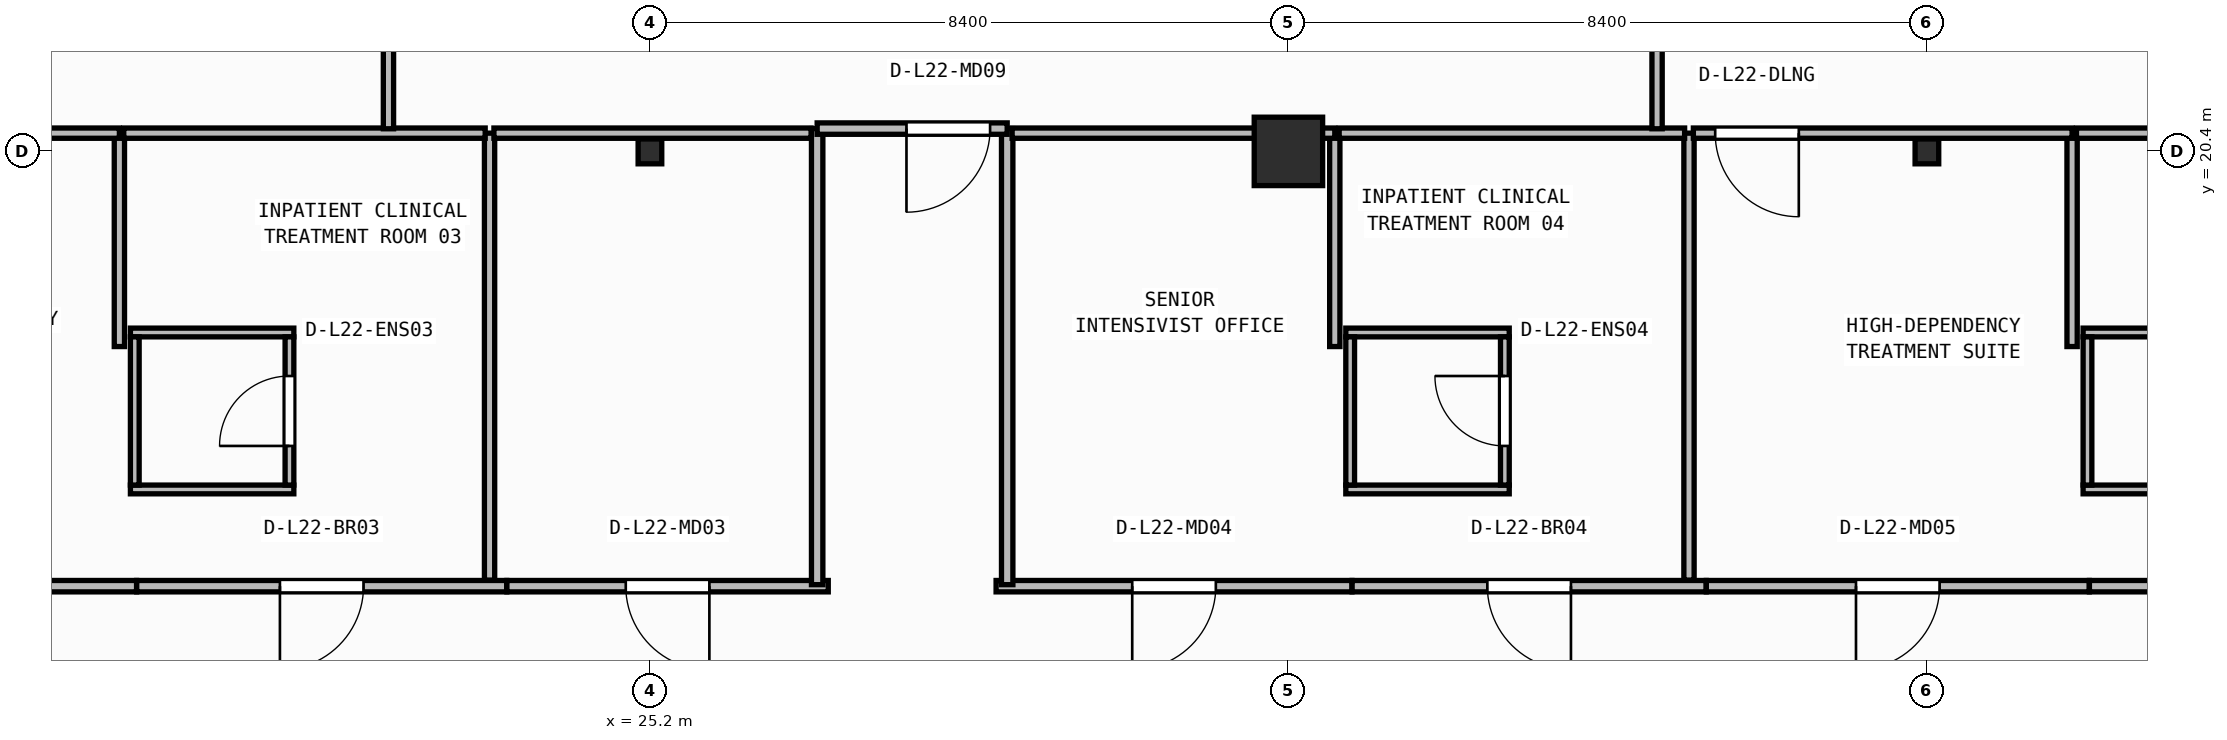
"""IFC4 building model, lengths in metres.
Left out: names, types, materials, properties, quantities, classifications, styles, units other than length and angle.
Written with IfcOpenShell. Run it as: python <this file> out.ifc"""

import sys

from ifc_helpers import new_model, si_unit, direction, frame, frame_2d, origin, origin_2d, place, context, subcontext, project, spatial, rectangle, i_section, extrude, element, fill, save


model = new_model("IFC4")
c1 = context("Model", 3, precision=1e-05, world=origin(), true_north=direction((0.0, 1.0)))
c2 = subcontext(c1, "Body", "Model", "MODEL_VIEW")
j1 = project(units=[si_unit("LENGTHUNIT", "METRE"), si_unit("PLANEANGLEUNIT", "RADIAN")], contexts=[c1])
p1 = place(None, origin())
s1 = spatial("IfcSite", under=j1, at=p1, CompositionType="ELEMENT")
p2 = place(p1, origin())
s2 = spatial("IfcBuilding", under=s1, at=p2, CompositionType="ELEMENT")
p3 = place(p2, frame((0.0, 0.0, 89.65)))
s3 = spatial("IfcBuildingStorey", under=s2, at=p3, CompositionType="ELEMENT", Elevation=89.65)
p4 = place(p3, frame((25.2, 20.4, 0.0), z_axis=(0.0, 0.0, 1.0), x_axis=(1.0, 0.0, 0.0)))
e1 = element("IfcColumn", 1, at=p4, inside=s3, PredefinedType="COLUMN", context=c2, shape_type="SweptSolid", body=[
    extrude(i_section(OverallWidth=0.311, OverallDepth=0.327, WebThickness=0.016, FlangeThickness=0.025, FilletRadius=0.017, at=origin_2d()), origin(), (0.0, 0.0, 1.0), 3.95),
])
p5 = place(p3, frame((33.6, 20.4, 0.0), z_axis=(0.0, 0.0, 1.0), x_axis=(1.0, 0.0, 0.0)))
e2 = element("IfcColumn", 2, at=p5, inside=s3, PredefinedType="COLUMN", context=c2, shape_type="SweptSolid", body=[
    extrude(rectangle(XDim=0.9, YDim=0.9, at=origin_2d()), origin(), (0.0, 0.0, 1.0), 3.95),
])
p6 = place(p3, frame((42.0, 20.4, 0.0), z_axis=(0.0, 0.0, 1.0), x_axis=(1.0, 0.0, 0.0)))
e3 = element("IfcColumn", 3, at=p6, inside=s3, PredefinedType="COLUMN", context=c2, shape_type="SweptSolid", body=[
    extrude(i_section(OverallWidth=0.311, OverallDepth=0.327, WebThickness=0.016, FlangeThickness=0.025, FilletRadius=0.017, at=origin_2d()), origin(), (0.0, 0.0, 1.0), 3.95),
])
for number, where, z_axis, x_axis in (
    (4, (18.365, 15.952, 0.0), (0.0, 0.0, 1.0), (1.0, 0.0, 0.0)),
    (5, (18.365, 18.018, 0.0), (0.0, 0.0, 1.0), (1.0, 0.0, 0.0)),
):
    element("IfcWall", number, at=place(p3, frame(where, z_axis=z_axis, x_axis=x_axis)), inside=s3, PredefinedType="PARTITIONING", context=c2, shape_type="SweptSolid", body=[
        extrude(rectangle(XDim=2.15, YDim=0.115, at=frame_2d((1.075, 0.0))), origin(), (0.0, 0.0, 1.0), 3.71),
    ])
p7 = place(p3, frame((18.423, 16.01, 0.0), z_axis=(0.0, 0.0, 1.0), x_axis=(0.0, 1.0, 0.0)))
e6 = element("IfcWall", 6, at=p7, inside=s3, PredefinedType="PARTITIONING", context=c2, shape_type="SweptSolid", body=[
    extrude(rectangle(XDim=1.95, YDim=0.115, at=frame_2d((0.975, 0.0))), origin(), (0.0, 0.0, 1.0), 3.71),
])
p8 = place(p3, frame((20.458, 16.01, 0.0), z_axis=(0.0, 0.0, 1.0), x_axis=(0.0, 1.0, 0.0)))
e7 = element("IfcWall", 7, at=p8, inside=s3, PredefinedType="PARTITIONING", context=c2, shape_type="SweptSolid", body=[
    extrude(rectangle(XDim=1.95, YDim=0.115, at=frame_2d((0.975, 0.0))), origin(), (0.0, 0.0, 1.0), 3.71),
])
p9 = place(p8, frame((0.515, 0.0, 0.0)))
e8 = element("IfcOpeningElement", 8, at=p9, cuts=e7, PredefinedType="OPENING", context=c2, shape_type="SweptSolid", body=[
    extrude(rectangle(XDim=0.92, YDim=2.1, at=frame_2d((0.46, 1.05))), frame((0.0, 0.067, 0.0), z_axis=(0.0, -1.0, 0.0), x_axis=(1.0, 0.0, 0.0)), (0.0, 0.0, 1.0), 0.135),
])
p10 = place(p3, frame((34.355, 15.952, 0.0), z_axis=(0.0, 0.0, 1.0), x_axis=(1.0, 0.0, 0.0)))
e9 = element("IfcWall", 9, at=p10, inside=s3, PredefinedType="PARTITIONING", context=c2, shape_type="SweptSolid", body=[
    extrude(rectangle(XDim=2.15, YDim=0.115, at=frame_2d((1.075, 0.0))), origin(), (0.0, 0.0, 1.0), 3.329),
])
p11 = place(p3, frame((34.355, 18.018, 0.0), z_axis=(0.0, 0.0, 1.0), x_axis=(1.0, 0.0, 0.0)))
e10 = element("IfcWall", 10, at=p11, inside=s3, PredefinedType="PARTITIONING", context=c2, shape_type="SweptSolid", body=[
    extrude(rectangle(XDim=2.15, YDim=0.115, at=frame_2d((1.075, 0.0))), origin(), (0.0, 0.0, 1.0), 3.71),
])
p12 = place(p3, frame((34.413, 16.01, 0.0), z_axis=(0.0, 0.0, 1.0), x_axis=(0.0, 1.0, 0.0)))
e11 = element("IfcWall", 11, at=p12, inside=s3, PredefinedType="PARTITIONING", context=c2, shape_type="SweptSolid", body=[
    extrude(rectangle(XDim=1.95, YDim=0.115, at=frame_2d((0.975, 0.0))), origin(), (0.0, 0.0, 1.0), 3.71),
])
p13 = place(p3, frame((36.448, 16.01, 0.0), z_axis=(0.0, 0.0, 1.0), x_axis=(0.0, 1.0, 0.0)))
e12 = element("IfcWall", 12, at=p13, inside=s3, PredefinedType="PARTITIONING", context=c2, shape_type="SweptSolid", body=[
    extrude(rectangle(XDim=1.95, YDim=0.115, at=frame_2d((0.975, 0.0))), origin(), (0.0, 0.0, 1.0), 3.71),
])
p14 = place(p13, frame((0.515, 0.0, 0.0)))
e13 = element("IfcOpeningElement", 13, at=p14, cuts=e12, PredefinedType="OPENING", context=c2, shape_type="SweptSolid", body=[
    extrude(rectangle(XDim=0.92, YDim=2.1, at=frame_2d((0.46, 1.05))), frame((0.0, 0.067, 0.0), z_axis=(0.0, -1.0, 0.0), x_axis=(1.0, 0.0, 0.0)), (0.0, 0.0, 1.0), 0.135),
])
p15 = place(p3, frame((44.055, 15.952, 0.0), z_axis=(0.0, 0.0, 1.0), x_axis=(1.0, 0.0, 0.0)))
e14 = element("IfcWall", 14, at=p15, inside=s3, PredefinedType="PARTITIONING", context=c2, shape_type="SweptSolid", body=[
    extrude(rectangle(XDim=2.15, YDim=0.115, at=frame_2d((1.075, 0.0))), origin(), (0.0, 0.0, 1.0), 3.329),
])
p16 = place(p3, frame((44.055, 18.018, 0.0), z_axis=(0.0, 0.0, 1.0), x_axis=(1.0, 0.0, 0.0)))
e15 = element("IfcWall", 15, at=p16, inside=s3, PredefinedType="PARTITIONING", context=c2, shape_type="SweptSolid", body=[
    extrude(rectangle(XDim=2.15, YDim=0.115, at=frame_2d((1.075, 0.0))), origin(), (0.0, 0.0, 1.0), 3.71),
])
p17 = place(p3, frame((44.113, 16.01, 0.0), z_axis=(0.0, 0.0, 1.0), x_axis=(0.0, 1.0, 0.0)))
e16 = element("IfcWall", 16, at=p17, inside=s3, PredefinedType="PARTITIONING", context=c2, shape_type="SweptSolid", body=[
    extrude(rectangle(XDim=1.95, YDim=0.115, at=frame_2d((0.975, 0.0))), origin(), (0.0, 0.0, 1.0), 3.71),
])
p18 = place(p3, frame((18.446, 14.68, 0.0), z_axis=(0.0, 0.0, 1.0), x_axis=(-1.0, 0.0, 0.0)))
e17 = element("IfcWall", 17, at=p18, inside=s3, PredefinedType="PARTITIONING", context=c2, shape_type="SweptSolid", body=[
    extrude(rectangle(XDim=4.508, YDim=0.15, at=frame_2d((2.254, 0.0))), origin(), (0.0, 0.0, 1.0), 3.71),
])
p19 = place(p18, frame((1.704, 0.0, 0.0)))
e18 = element("IfcOpeningElement", 18, at=p19, cuts=e17, PredefinedType="OPENING", context=c2, shape_type="SweptSolid", body=[
    extrude(rectangle(XDim=1.1, YDim=2.1, at=frame_2d((0.55, 1.05))), frame((0.0, 0.085, 0.0), z_axis=(0.0, -1.0, 0.0), x_axis=(1.0, 0.0, 0.0)), (0.0, 0.0, 1.0), 0.17),
])
p20 = place(p3, frame((23.316, 14.68, 0.0), z_axis=(0.0, 0.0, 1.0), x_axis=(-1.0, 0.0, 0.0)))
e19 = element("IfcWall", 19, at=p20, inside=s3, PredefinedType="PARTITIONING", context=c2, shape_type="SweptSolid", body=[
    extrude(rectangle(XDim=4.868, YDim=0.15, at=frame_2d((2.434, 0.0))), origin(), (0.0, 0.0, 1.0), 3.71),
])
p21 = place(p20, frame((1.884, 0.0, 0.0)))
e20 = element("IfcOpeningElement", 20, at=p21, cuts=e19, PredefinedType="OPENING", context=c2, shape_type="SweptSolid", body=[
    extrude(rectangle(XDim=1.1, YDim=2.1, at=frame_2d((0.55, 1.05))), frame((0.0, 0.085, 0.0), z_axis=(0.0, -1.0, 0.0), x_axis=(1.0, 0.0, 0.0)), (0.0, 0.0, 1.0), 0.17),
])
p22 = place(p3, frame((27.546, 14.68, 0.0), z_axis=(0.0, 0.0, 1.0), x_axis=(-1.0, 0.0, 0.0)))
e21 = element("IfcWall", 21, at=p22, inside=s3, PredefinedType="PARTITIONING", context=c2, shape_type="SweptSolid", body=[
    extrude(rectangle(XDim=4.228, YDim=0.15, at=frame_2d((2.114, 0.0))), origin(), (0.0, 0.0, 1.0), 3.71),
])
p23 = place(p22, frame((1.564, 0.0, 0.0)))
e22 = element("IfcOpeningElement", 22, at=p23, cuts=e21, PredefinedType="OPENING", context=c2, shape_type="SweptSolid", body=[
    extrude(rectangle(XDim=1.1, YDim=2.1, at=frame_2d((0.55, 1.05))), frame((0.0, 0.085, 0.0), z_axis=(0.0, -1.0, 0.0), x_axis=(1.0, 0.0, 0.0)), (0.0, 0.0, 1.0), 0.17),
])
p24 = place(p3, frame((34.436, 14.68, 0.0), z_axis=(0.0, 0.0, 1.0), x_axis=(-1.0, 0.0, 0.0)))
e23 = element("IfcWall", 23, at=p24, inside=s3, PredefinedType="PARTITIONING", context=c2, shape_type="SweptSolid", body=[
    extrude(rectangle(XDim=4.682, YDim=0.15, at=frame_2d((2.341, 0.0))), origin(), (0.0, 0.0, 1.0), 3.71),
])
p25 = place(p24, frame((1.791, 0.0, 0.0)))
e24 = element("IfcOpeningElement", 24, at=p25, cuts=e23, PredefinedType="OPENING", context=c2, shape_type="SweptSolid", body=[
    extrude(rectangle(XDim=1.1, YDim=2.1, at=frame_2d((0.55, 1.05))), frame((0.0, 0.085, 0.0), z_axis=(0.0, -1.0, 0.0), x_axis=(1.0, 0.0, 0.0)), (0.0, 0.0, 1.0), 0.17),
])
p26 = place(p3, frame((39.096, 14.68, 0.0), z_axis=(0.0, 0.0, 1.0), x_axis=(-1.0, 0.0, 0.0)))
e25 = element("IfcWall", 25, at=p26, inside=s3, PredefinedType="PARTITIONING", context=c2, shape_type="SweptSolid", body=[
    extrude(rectangle(XDim=4.658, YDim=0.15, at=frame_2d((2.329, 0.0))), origin(), (0.0, 0.0, 1.0), 3.71),
])
p27 = place(p26, frame((1.779, 0.0, 0.0)))
e26 = element("IfcOpeningElement", 26, at=p27, cuts=e25, PredefinedType="OPENING", context=c2, shape_type="SweptSolid", body=[
    extrude(rectangle(XDim=1.1, YDim=2.1, at=frame_2d((0.55, 1.05))), frame((0.0, 0.085, 0.0), z_axis=(0.0, -1.0, 0.0), x_axis=(1.0, 0.0, 0.0)), (0.0, 0.0, 1.0), 0.17),
])
p28 = place(p3, frame((44.136, 14.68, 0.0), z_axis=(0.0, 0.0, 1.0), x_axis=(-1.0, 0.0, 0.0)))
e27 = element("IfcWall", 27, at=p28, inside=s3, PredefinedType="PARTITIONING", context=c2, shape_type="SweptSolid", body=[
    extrude(rectangle(XDim=5.038, YDim=0.15, at=frame_2d((2.519, 0.0))), origin(), (0.0, 0.0, 1.0), 3.71),
])
p29 = place(p28, frame((1.969, 0.0, 0.0)))
e28 = element("IfcOpeningElement", 28, at=p29, cuts=e27, PredefinedType="OPENING", context=c2, shape_type="SweptSolid", body=[
    extrude(rectangle(XDim=1.1, YDim=2.1, at=frame_2d((0.55, 1.05))), frame((0.0, 0.085, 0.0), z_axis=(0.0, -1.0, 0.0), x_axis=(1.0, 0.0, 0.0)), (0.0, 0.0, 1.0), 0.17),
])
p30 = place(p3, frame((48.426, 14.68, 0.0), z_axis=(0.0, 0.0, 1.0), x_axis=(-1.0, 0.0, 0.0)))
e29 = element("IfcWall", 29, at=p30, inside=s3, PredefinedType="PARTITIONING", context=c2, shape_type="SweptSolid", body=[
    extrude(rectangle(XDim=4.288, YDim=0.15, at=frame_2d((2.144, 0.0))), origin(), (0.0, 0.0, 1.0), 3.71),
])
p31 = place(p30, frame((1.594, 0.0, 0.0)))
e30 = element("IfcOpeningElement", 30, at=p31, cuts=e29, PredefinedType="OPENING", context=c2, shape_type="SweptSolid", body=[
    extrude(rectangle(XDim=1.1, YDim=2.1, at=frame_2d((0.55, 1.05))), frame((0.0, 0.085, 0.0), z_axis=(0.0, -1.0, 0.0), x_axis=(1.0, 0.0, 0.0)), (0.0, 0.0, 1.0), 0.17),
])
for number, where, z_axis, x_axis in (
    (31, (27.4, 20.7, 0.0), (0.0, 0.0, 1.0), (0.0, -1.0, 0.0)),
    (32, (29.9, 14.7, 0.0), (0.0, 0.0, 1.0), (0.0, 1.0, 0.0)),
):
    element("IfcWall", number, at=place(p3, frame(where, z_axis=z_axis, x_axis=x_axis)), inside=s3, PredefinedType="PARTITIONING", context=c2, shape_type="SweptSolid", body=[
        extrude(rectangle(XDim=6.0, YDim=0.15, at=frame_2d((3.0, 0.0))), origin(), (0.0, 0.0, 1.0), 3.71),
    ])
p32 = place(p3, frame((29.9, 20.7, 0.0), z_axis=(0.0, 0.0, 1.0), x_axis=(-1.0, 0.0, 0.0)))
e33 = element("IfcWall", 33, at=p32, inside=s3, PredefinedType="PARTITIONING", context=c2, shape_type="SweptSolid", body=[
    extrude(rectangle(XDim=2.5, YDim=0.15, at=frame_2d((1.25, 0.0))), origin(), (0.0, 0.0, 1.0), 3.073),
])
p33 = place(p32, frame((0.225, 0.0, 0.0)))
e34 = element("IfcOpeningElement", 34, at=p33, cuts=e33, PredefinedType="OPENING", context=c2, shape_type="SweptSolid", body=[
    extrude(rectangle(XDim=1.1, YDim=2.1, at=frame_2d((0.55, 1.05))), frame((0.0, 0.085, 0.0), z_axis=(0.0, -1.0, 0.0), x_axis=(1.0, 0.0, 0.0)), (0.0, 0.0, 1.0), 0.17),
])
p34 = place(p3, frame((18.22, 17.833, 0.0), z_axis=(0.0, 0.0, 1.0), x_axis=(0.0, 1.0, 0.0)))
e35 = element("IfcWall", 35, at=p34, inside=s3, PredefinedType="PARTITIONING", context=c2, shape_type="SweptSolid", body=[
    extrude(rectangle(XDim=2.807, YDim=0.135, at=frame_2d((1.404, 0.0))), origin(), (0.0, 0.0, 1.0), 3.71),
])
p35 = place(p3, frame((18.22, 20.64, 0.0), z_axis=(0.0, 0.0, 1.0), x_axis=(-1.0, 0.0, 0.0)))
e36 = element("IfcWall", 36, at=p35, inside=s3, PredefinedType="PARTITIONING", context=c2, shape_type="SweptSolid", body=[
    extrude(rectangle(XDim=4.452, YDim=0.135, at=frame_2d((2.226, 0.0))), origin(), (0.0, 0.0, 1.0), 3.073),
])
p36 = place(p3, frame((23.09, 14.76, 0.0), z_axis=(0.0, 0.0, 1.0), x_axis=(0.0, 1.0, 0.0)))
e37 = element("IfcWall", 37, at=p36, inside=s3, PredefinedType="PARTITIONING", context=c2, shape_type="SweptSolid", body=[
    extrude(rectangle(XDim=5.88, YDim=0.135, at=frame_2d((2.94, 0.0))), origin(), (0.0, 0.0, 1.0), 3.71),
])
p37 = place(p3, frame((23.032, 20.64, 0.0), z_axis=(0.0, 0.0, 1.0), x_axis=(-1.0, 0.0, 0.0)))
e38 = element("IfcWall", 38, at=p37, inside=s3, PredefinedType="PARTITIONING", context=c2, shape_type="SweptSolid", body=[
    extrude(rectangle(XDim=4.755, YDim=0.135, at=frame_2d((2.377, 0.0))), origin(), (0.0, 0.0, 1.0), 3.073),
])
p38 = place(p3, frame((27.32, 20.64, 0.0), z_axis=(0.0, 0.0, 1.0), x_axis=(-1.0, 0.0, 0.0)))
e39 = element("IfcWall", 39, at=p38, inside=s3, PredefinedType="PARTITIONING", context=c2, shape_type="SweptSolid", body=[
    extrude(rectangle(XDim=4.173, YDim=0.135, at=frame_2d((2.086, 0.0))), origin(), (0.0, 0.0, 1.0), 3.073),
])
p39 = place(p3, frame((34.21, 17.833, 0.0), z_axis=(0.0, 0.0, 1.0), x_axis=(0.0, 1.0, 0.0)))
e40 = element("IfcWall", 40, at=p39, inside=s3, PredefinedType="PARTITIONING", context=c2, shape_type="SweptSolid", body=[
    extrude(rectangle(XDim=2.807, YDim=0.135, at=frame_2d((1.404, 0.0))), origin(), (0.0, 0.0, 1.0), 3.71),
])
p40 = place(p3, frame((34.21, 20.64, 0.0), z_axis=(0.0, 0.0, 1.0), x_axis=(-1.0, 0.0, 0.0)))
e41 = element("IfcWall", 41, at=p40, inside=s3, PredefinedType="PARTITIONING", context=c2, shape_type="SweptSolid", body=[
    extrude(rectangle(XDim=4.245, YDim=0.135, at=frame_2d((2.123, 0.0))), origin(), (0.0, 0.0, 1.0), 3.073),
])
p41 = place(p3, frame((38.87, 14.76, 0.0), z_axis=(0.0, 0.0, 1.0), x_axis=(0.0, 1.0, 0.0)))
e42 = element("IfcWall", 42, at=p41, inside=s3, PredefinedType="PARTITIONING", context=c2, shape_type="SweptSolid", body=[
    extrude(rectangle(XDim=5.88, YDim=0.135, at=frame_2d((2.94, 0.0))), origin(), (0.0, 0.0, 1.0), 3.71),
])
p42 = place(p3, frame((38.812, 20.64, 0.0), z_axis=(0.0, 0.0, 1.0), x_axis=(-1.0, 0.0, 0.0)))
e43 = element("IfcWall", 43, at=p42, inside=s3, PredefinedType="PARTITIONING", context=c2, shape_type="SweptSolid", body=[
    extrude(rectangle(XDim=4.545, YDim=0.135, at=frame_2d((2.272, 0.0))), origin(), (0.0, 0.0, 1.0), 3.073),
])
p43 = place(p3, frame((43.91, 17.833, 0.0), z_axis=(0.0, 0.0, 1.0), x_axis=(0.0, 1.0, 0.0)))
e44 = element("IfcWall", 44, at=p43, inside=s3, PredefinedType="PARTITIONING", context=c2, shape_type="SweptSolid", body=[
    extrude(rectangle(XDim=2.807, YDim=0.135, at=frame_2d((1.404, 0.0))), origin(), (0.0, 0.0, 1.0), 3.71),
])
p44 = place(p3, frame((43.91, 20.64, 0.0), z_axis=(0.0, 0.0, 1.0), x_axis=(-1.0, 0.0, 0.0)))
e45 = element("IfcWall", 45, at=p44, inside=s3, PredefinedType="PARTITIONING", context=c2, shape_type="SweptSolid", body=[
    extrude(rectangle(XDim=4.982, YDim=0.135, at=frame_2d((2.491, 0.0))), origin(), (0.0, 0.0, 1.0), 3.073),
])
p45 = place(p44, frame((3.595, 0.0, 0.0)))
e46 = element("IfcOpeningElement", 46, at=p45, cuts=e45, PredefinedType="OPENING", context=c2, shape_type="SweptSolid", body=[
    extrude(rectangle(XDim=1.1, YDim=2.1, at=frame_2d((0.55, 1.05))), frame((0.0, 0.077, 0.0), z_axis=(0.0, -1.0, 0.0), x_axis=(1.0, 0.0, 0.0)), (0.0, 0.0, 1.0), 0.155),
])
p46 = place(p3, frame((46.117, 20.64, 0.0), z_axis=(0.0, 0.0, 1.0), x_axis=(-1.0, 0.0, 0.0)))
e47 = element("IfcWall", 47, at=p46, inside=s3, PredefinedType="PARTITIONING", context=c2, shape_type="SweptSolid", body=[
    extrude(rectangle(XDim=2.15, YDim=0.135, at=frame_2d((1.075, 0.0))), origin(), (0.0, 0.0, 1.0), 3.073),
])
for number, where, z_axis, x_axis in (
    (48, (21.76, 20.698, 0.0), (0.0, 0.0, 1.0), (0.0, 1.0, 0.0)),
    (49, (38.45, 20.698, 0.0), (0.0, 0.0, 1.0), (0.0, 1.0, 0.0)),
):
    element("IfcWall", number, at=place(p3, frame(where, z_axis=z_axis, x_axis=x_axis)), inside=s3, PredefinedType="PARTITIONING", context=c2, shape_type="SweptSolid", body=[
        extrude(rectangle(XDim=6.442, YDim=0.135, at=frame_2d((3.221, 0.0))), origin(), (0.0, 0.0, 1.0), 3.71),
    ])
p47 = place(p9, origin())
e50 = element("IfcDoor", 50, at=p47, inside=s3, OperationType="SINGLE_SWING_LEFT", PredefinedType="DOOR", context=c2, shape_type="SweptSolid", body=[
    extrude(rectangle(XDim=0.92, YDim=2.1, at=frame_2d((0.46, 1.05))), frame((0.0, 0.025, 0.0), z_axis=(0.0, -1.0, 0.0), x_axis=(1.0, 0.0, 0.0)), (0.0, 0.0, 1.0), 0.05),
])
fill(e8, e50)
p48 = place(p14, origin())
e51 = element("IfcDoor", 51, at=p48, inside=s3, OperationType="SINGLE_SWING_RIGHT", PredefinedType="DOOR", context=c2, shape_type="SweptSolid", body=[
    extrude(rectangle(XDim=0.92, YDim=2.1, at=frame_2d((0.46, 1.05))), frame((0.0, 0.025, 0.0), z_axis=(0.0, -1.0, 0.0), x_axis=(1.0, 0.0, 0.0)), (0.0, 0.0, 1.0), 0.05),
])
fill(e13, e51)
p49 = place(p21, origin())
e52 = element("IfcDoor", 52, at=p49, inside=s3, OperationType="SINGLE_SWING_RIGHT", PredefinedType="DOOR", context=c2, shape_type="SweptSolid", body=[
    extrude(rectangle(XDim=1.1, YDim=2.1, at=frame_2d((0.55, 1.05))), frame((0.0, 0.025, 0.0), z_axis=(0.0, -1.0, 0.0), x_axis=(1.0, 0.0, 0.0)), (0.0, 0.0, 1.0), 0.05),
])
fill(e20, e52)
p50 = place(p23, origin())
e53 = element("IfcDoor", 53, at=p50, inside=s3, OperationType="SINGLE_SWING_LEFT", PredefinedType="DOOR", context=c2, shape_type="SweptSolid", body=[
    extrude(rectangle(XDim=1.1, YDim=2.1, at=frame_2d((0.55, 1.05))), frame((0.0, 0.025, 0.0), z_axis=(0.0, -1.0, 0.0), x_axis=(1.0, 0.0, 0.0)), (0.0, 0.0, 1.0), 0.05),
])
fill(e22, e53)
p51 = place(p25, origin())
e54 = element("IfcDoor", 54, at=p51, inside=s3, OperationType="SINGLE_SWING_RIGHT", PredefinedType="DOOR", context=c2, shape_type="SweptSolid", body=[
    extrude(rectangle(XDim=1.1, YDim=2.1, at=frame_2d((0.55, 1.05))), frame((0.0, 0.025, 0.0), z_axis=(0.0, -1.0, 0.0), x_axis=(1.0, 0.0, 0.0)), (0.0, 0.0, 1.0), 0.05),
])
fill(e24, e54)
p52 = place(p27, origin())
e55 = element("IfcDoor", 55, at=p52, inside=s3, OperationType="SINGLE_SWING_LEFT", PredefinedType="DOOR", context=c2, shape_type="SweptSolid", body=[
    extrude(rectangle(XDim=1.1, YDim=2.1, at=frame_2d((0.55, 1.05))), frame((0.0, 0.025, 0.0), z_axis=(0.0, -1.0, 0.0), x_axis=(1.0, 0.0, 0.0)), (0.0, 0.0, 1.0), 0.05),
])
fill(e26, e55)
p53 = place(p29, origin())
e56 = element("IfcDoor", 56, at=p53, inside=s3, OperationType="SINGLE_SWING_RIGHT", PredefinedType="DOOR", context=c2, shape_type="SweptSolid", body=[
    extrude(rectangle(XDim=1.1, YDim=2.1, at=frame_2d((0.55, 1.05))), frame((0.0, 0.025, 0.0), z_axis=(0.0, -1.0, 0.0), x_axis=(1.0, 0.0, 0.0)), (0.0, 0.0, 1.0), 0.05),
])
fill(e28, e56)
p54 = place(p33, origin())
e57 = element("IfcDoor", 57, at=p54, inside=s3, OperationType="SINGLE_SWING_RIGHT", PredefinedType="DOOR", context=c2, shape_type="SweptSolid", body=[
    extrude(rectangle(XDim=1.1, YDim=2.1, at=frame_2d((0.55, 1.05))), frame((0.0, 0.025, 0.0), z_axis=(0.0, -1.0, 0.0), x_axis=(1.0, 0.0, 0.0)), (0.0, 0.0, 1.0), 0.05),
])
fill(e34, e57)
p55 = place(p45, origin())
e58 = element("IfcDoor", 58, at=p55, inside=s3, OperationType="SINGLE_SWING_LEFT", PredefinedType="DOOR", context=c2, shape_type="SweptSolid", body=[
    extrude(rectangle(XDim=1.1, YDim=2.1, at=frame_2d((0.55, 1.05))), frame((0.0, 0.025, 0.0), z_axis=(0.0, -1.0, 0.0), x_axis=(1.0, 0.0, 0.0)), (0.0, 0.0, 1.0), 0.05),
])
fill(e46, e58)
save(model, sys.argv[1])
